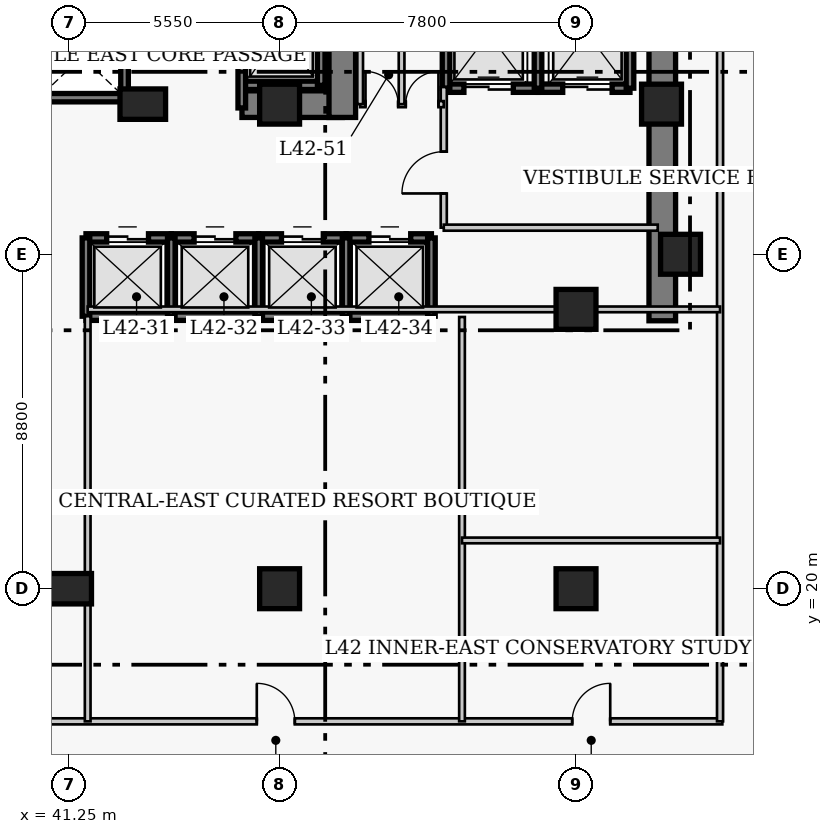
"""IFC4 building model, lengths in metres.
Left out: names, types, materials, properties, quantities, classifications, styles, units other than length and angle.
Written with IfcOpenShell. Run it as: python <this file> out.ifc"""

import sys

from ifc_helpers import new_model, si_unit, direction, frame, frame_2d, origin, origin_2d, place, context, subcontext, project, spatial, rectangle, extrude, element, fill, save


model = new_model("IFC4")
c1 = context("Model", 3, precision=1e-05, world=origin(), true_north=direction((0.0, 1.0)))
c2 = subcontext(c1, "Body", "Model", "MODEL_VIEW")
j1 = project(units=[si_unit("LENGTHUNIT", "METRE"), si_unit("PLANEANGLEUNIT", "RADIAN")], contexts=[c1])
p1 = place(None, origin())
s1 = spatial("IfcSite", under=j1, at=p1, CompositionType="ELEMENT")
p2 = place(p1, origin())
s2 = spatial("IfcBuilding", under=s1, at=p2, CompositionType="ELEMENT")
p3 = place(p2, frame((0.0, 0.0, 168.8)))
s3 = spatial("IfcBuildingStorey", under=s2, at=p3, CompositionType="ELEMENT", Elevation=168.8)
p4 = place(p3, frame((56.87, 27.05, 0.0), z_axis=(0.0, 0.0, 1.0), x_axis=(0.0, 1.0, 0.0)))
e1 = element("IfcWall", 1, at=p4, inside=s3, PredefinedType="SHEAR", context=c2, shape_type="SweptSolid", body=[
    extrude(rectangle(XDim=13.62, YDim=0.7, at=frame_2d((6.81, 0.0))), origin(), (0.0, 0.0, 1.0), 3.8),
])
p5 = place(p3, frame((45.81, 32.75, 0.0), z_axis=(0.0, 0.0, 1.0), x_axis=(1.0, 0.0, 0.0)))
e2 = element("IfcWall", 2, at=p5, inside=s3, PredefinedType="SHEAR", context=c2, shape_type="SweptSolid", body=[
    extrude(rectangle(XDim=2.64, YDim=0.7, at=frame_2d((1.32, 0.0))), origin(), (0.0, 0.0, 1.0), 3.8),
])
p6 = place(p3, frame((48.45, 32.4, 0.0), z_axis=(0.0, 0.0, 1.0), x_axis=(0.0, 1.0, 0.0)))
e3 = element("IfcWall", 3, at=p6, inside=s3, PredefinedType="SHEAR", context=c2, shape_type="SweptSolid", body=[
    extrude(rectangle(XDim=7.92, YDim=0.7, at=frame_2d((3.96, 0.0))), origin(), (0.0, 0.0, 1.0), 3.8),
])
p7 = place(p6, frame((5.8, 0.0, 0.0)))
e4 = element("IfcOpeningElement", 4, at=p7, cuts=e3, PredefinedType="OPENING", context=c2, shape_type="SweptSolid", body=[
    extrude(rectangle(XDim=1.1, YDim=2.15, at=frame_2d((0.55, 1.075))), frame((0.0, 0.36, 0.0), z_axis=(0.0, -1.0, 0.0), x_axis=(1.0, 0.0, 0.0)), (0.0, 0.0, 1.0), 0.72),
])
p8 = place(p3, frame((41.25, 20.0, 0.0), z_axis=(0.0, 0.0, 1.0), x_axis=(1.0, 0.0, 0.0)))
e5 = element("IfcColumn", 5, at=p8, inside=s3, PredefinedType="COLUMN", context=c2, shape_type="SweptSolid", body=[
    extrude(rectangle(XDim=1.2, YDim=0.8, at=origin_2d()), origin(), (0.0, 0.0, 1.0), 3.8),
])
for number, where, z_axis, x_axis in (
    (6, (46.8, 20.0, 0.0), (0.0, 0.0, 1.0), (1.0, 0.0, 0.0)),
    (7, (54.6, 20.0, 0.0), (0.0, 0.0, 1.0), (1.0, 0.0, 0.0)),
    (8, (57.35, 28.8, 0.0), (0.0, 0.0, 1.0), (1.0, 0.0, 0.0)),
):
    element("IfcColumn", number, at=place(p3, frame(where, z_axis=z_axis, x_axis=x_axis)), inside=s3, PredefinedType="COLUMN", context=c2, shape_type="SweptSolid", body=[
        extrude(rectangle(XDim=1.05, YDim=1.05, at=origin_2d()), origin(), (0.0, 0.0, 1.0), 3.8),
    ])
p9 = place(p3, frame((43.2, 32.75, 0.0), z_axis=(0.0, 0.0, 1.0), x_axis=(1.0, 0.0, 0.0)))
e9 = element("IfcColumn", 9, at=p9, inside=s3, PredefinedType="COLUMN", context=c2, shape_type="SweptSolid", body=[
    extrude(rectangle(XDim=1.2, YDim=0.8, at=origin_2d()), origin(), (0.0, 0.0, 1.0), 3.8),
])
for number, where, z_axis, x_axis in (
    (10, (46.8, 32.75, 0.0), (0.0, 0.0, 1.0), (1.0, 0.0, 0.0)),
    (11, (54.6, 27.35, 0.0), (0.0, 0.0, 1.0), (1.0, 0.0, 0.0)),
    (12, (56.85, 32.75, 0.0), (0.0, 0.0, 1.0), (1.0, 0.0, 0.0)),
):
    element("IfcColumn", number, at=place(p3, frame(where, z_axis=z_axis, x_axis=x_axis)), inside=s3, PredefinedType="COLUMN", context=c2, shape_type="SweptSolid", body=[
        extrude(rectangle(XDim=1.05, YDim=1.05, at=origin_2d()), origin(), (0.0, 0.0, 1.0), 3.8),
    ])
p10 = place(p3, frame((41.705, 29.23, 0.0), z_axis=(0.0, 0.0, 1.0), x_axis=(1.0, 0.0, 0.0)))
e13 = element("IfcWall", 13, at=p10, inside=s3, PredefinedType="SHEAR", context=c2, shape_type="SweptSolid", body=[
    extrude(rectangle(XDim=2.245, YDim=0.22, at=frame_2d((1.123, 0.0))), origin(), (0.0, 0.0, 1.0), 3.8),
])
p11 = place(p10, frame((0.545, 0.0, 0.0)))
e14 = element("IfcOpeningElement", 14, at=p11, cuts=e13, PredefinedType="OPENING", context=c2, shape_type="SweptSolid", body=[
    extrude(rectangle(XDim=1.1, YDim=2.15, at=frame_2d((0.55, 1.075))), frame((0.0, 0.12, 0.0), z_axis=(0.0, -1.0, 0.0), x_axis=(1.0, 0.0, 0.0)), (0.0, 0.0, 1.0), 0.24),
])
p12 = place(p3, frame((41.705, 27.17, 0.0), z_axis=(0.0, 0.0, 1.0), x_axis=(1.0, 0.0, 0.0)))
e15 = element("IfcWall", 15, at=p12, inside=s3, PredefinedType="SHEAR", context=c2, shape_type="SweptSolid", body=[
    extrude(rectangle(XDim=2.245, YDim=0.22, at=frame_2d((1.123, 0.0))), origin(), (0.0, 0.0, 1.0), 3.8),
])
p13 = place(p3, frame((41.705, 27.17, 0.0), z_axis=(0.0, 0.0, 1.0), x_axis=(0.0, 1.0, 0.0)))
e16 = element("IfcWall", 16, at=p13, inside=s3, PredefinedType="SHEAR", context=c2, shape_type="SweptSolid", body=[
    extrude(rectangle(XDim=2.06, YDim=0.2, at=frame_2d((1.03, 0.0))), origin(), (0.0, 0.0, 1.0), 3.8),
])
p14 = place(p3, frame((43.95, 29.23, 0.0), z_axis=(0.0, 0.0, 1.0), x_axis=(1.0, 0.0, 0.0)))
e17 = element("IfcWall", 17, at=p14, inside=s3, PredefinedType="SHEAR", context=c2, shape_type="SweptSolid", body=[
    extrude(rectangle(XDim=2.3, YDim=0.22, at=frame_2d((1.15, 0.0))), origin(), (0.0, 0.0, 1.0), 3.8),
])
p15 = place(p14, frame((0.6, 0.0, 0.0)))
e18 = element("IfcOpeningElement", 18, at=p15, cuts=e17, PredefinedType="OPENING", context=c2, shape_type="SweptSolid", body=[
    extrude(rectangle(XDim=1.1, YDim=2.15, at=frame_2d((0.55, 1.075))), frame((0.0, 0.12, 0.0), z_axis=(0.0, -1.0, 0.0), x_axis=(1.0, 0.0, 0.0)), (0.0, 0.0, 1.0), 0.24),
])
p16 = place(p3, frame((43.95, 27.17, 0.0), z_axis=(0.0, 0.0, 1.0), x_axis=(1.0, 0.0, 0.0)))
e19 = element("IfcWall", 19, at=p16, inside=s3, PredefinedType="SHEAR", context=c2, shape_type="SweptSolid", body=[
    extrude(rectangle(XDim=2.3, YDim=0.22, at=frame_2d((1.15, 0.0))), origin(), (0.0, 0.0, 1.0), 3.8),
])
p17 = place(p3, frame((43.95, 27.17, 0.0), z_axis=(0.0, 0.0, 1.0), x_axis=(0.0, 1.0, 0.0)))
e20 = element("IfcWall", 20, at=p17, inside=s3, PredefinedType="SHEAR", context=c2, shape_type="SweptSolid", body=[
    extrude(rectangle(XDim=2.06, YDim=0.2, at=frame_2d((1.03, 0.0))), origin(), (0.0, 0.0, 1.0), 3.8),
])
p18 = place(p3, frame((46.25, 29.23, 0.0), z_axis=(0.0, 0.0, 1.0), x_axis=(1.0, 0.0, 0.0)))
e21 = element("IfcWall", 21, at=p18, inside=s3, PredefinedType="SHEAR", context=c2, shape_type="SweptSolid", body=[
    extrude(rectangle(XDim=2.3, YDim=0.22, at=frame_2d((1.15, 0.0))), origin(), (0.0, 0.0, 1.0), 3.8),
])
p19 = place(p18, frame((0.6, 0.0, 0.0)))
e22 = element("IfcOpeningElement", 22, at=p19, cuts=e21, PredefinedType="OPENING", context=c2, shape_type="SweptSolid", body=[
    extrude(rectangle(XDim=1.1, YDim=2.15, at=frame_2d((0.55, 1.075))), frame((0.0, 0.12, 0.0), z_axis=(0.0, -1.0, 0.0), x_axis=(1.0, 0.0, 0.0)), (0.0, 0.0, 1.0), 0.24),
])
p20 = place(p3, frame((46.25, 27.17, 0.0), z_axis=(0.0, 0.0, 1.0), x_axis=(1.0, 0.0, 0.0)))
e23 = element("IfcWall", 23, at=p20, inside=s3, PredefinedType="SHEAR", context=c2, shape_type="SweptSolid", body=[
    extrude(rectangle(XDim=2.3, YDim=0.22, at=frame_2d((1.15, 0.0))), origin(), (0.0, 0.0, 1.0), 3.8),
])
p21 = place(p3, frame((46.25, 27.17, 0.0), z_axis=(0.0, 0.0, 1.0), x_axis=(0.0, 1.0, 0.0)))
e24 = element("IfcWall", 24, at=p21, inside=s3, PredefinedType="SHEAR", context=c2, shape_type="SweptSolid", body=[
    extrude(rectangle(XDim=2.06, YDim=0.2, at=frame_2d((1.03, 0.0))), origin(), (0.0, 0.0, 1.0), 3.8),
])
p22 = place(p3, frame((48.55, 29.23, 0.0), z_axis=(0.0, 0.0, 1.0), x_axis=(1.0, 0.0, 0.0)))
e25 = element("IfcWall", 25, at=p22, inside=s3, PredefinedType="SHEAR", context=c2, shape_type="SweptSolid", body=[
    extrude(rectangle(XDim=2.245, YDim=0.22, at=frame_2d((1.123, 0.0))), origin(), (0.0, 0.0, 1.0), 3.8),
])
p23 = place(p22, frame((0.6, 0.0, 0.0)))
e26 = element("IfcOpeningElement", 26, at=p23, cuts=e25, PredefinedType="OPENING", context=c2, shape_type="SweptSolid", body=[
    extrude(rectangle(XDim=1.1, YDim=2.15, at=frame_2d((0.55, 1.075))), frame((0.0, 0.12, 0.0), z_axis=(0.0, -1.0, 0.0), x_axis=(1.0, 0.0, 0.0)), (0.0, 0.0, 1.0), 0.24),
])
p24 = place(p3, frame((48.55, 27.17, 0.0), z_axis=(0.0, 0.0, 1.0), x_axis=(1.0, 0.0, 0.0)))
e27 = element("IfcWall", 27, at=p24, inside=s3, PredefinedType="SHEAR", context=c2, shape_type="SweptSolid", body=[
    extrude(rectangle(XDim=2.245, YDim=0.22, at=frame_2d((1.123, 0.0))), origin(), (0.0, 0.0, 1.0), 3.8),
])
for number, where, z_axis, x_axis in (
    (28, (48.55, 27.17, 0.0), (0.0, 0.0, 1.0), (0.0, 1.0, 0.0)),
    (29, (50.795, 27.17, 0.0), (0.0, 0.0, 1.0), (0.0, 1.0, 0.0)),
):
    element("IfcWall", number, at=place(p3, frame(where, z_axis=z_axis, x_axis=x_axis)), inside=s3, PredefinedType="SHEAR", context=c2, shape_type="SweptSolid", body=[
        extrude(rectangle(XDim=2.06, YDim=0.2, at=frame_2d((1.03, 0.0))), origin(), (0.0, 0.0, 1.0), 3.8),
    ])
p25 = place(p3, frame((40.4, 32.92, 0.0), z_axis=(0.0, 0.0, 1.0), x_axis=(1.0, 0.0, 0.0)))
e30 = element("IfcWall", 30, at=p25, inside=s3, PredefinedType="SHEAR", context=c2, shape_type="SweptSolid", body=[
    extrude(rectangle(XDim=2.32, YDim=0.22, at=frame_2d((1.16, 0.0))), origin(), (0.0, 0.0, 1.0), 3.8),
])
p26 = place(p3, frame((42.72, 32.92, 0.0), z_axis=(0.0, 0.0, 1.0), x_axis=(0.0, 1.0, 0.0)))
e31 = element("IfcWall", 31, at=p26, inside=s3, PredefinedType="SHEAR", context=c2, shape_type="SweptSolid", body=[
    extrude(rectangle(XDim=2.16, YDim=0.2, at=frame_2d((1.08, 0.0))), origin(), (0.0, 0.0, 1.0), 3.8),
])
p27 = place(p3, frame((51.18, 33.17, 0.0), z_axis=(0.0, 0.0, 1.0), x_axis=(1.0, 0.0, 0.0)))
e32 = element("IfcWall", 32, at=p27, inside=s3, PredefinedType="SHEAR", context=c2, shape_type="SweptSolid", body=[
    extrude(rectangle(XDim=2.42, YDim=0.22, at=frame_2d((1.21, 0.0))), origin(), (0.0, 0.0, 1.0), 3.8),
])
p28 = place(p27, frame((0.47, 0.0, 0.0)))
e33 = element("IfcOpeningElement", 33, at=p28, cuts=e32, PredefinedType="OPENING", context=c2, shape_type="SweptSolid", body=[
    extrude(rectangle(XDim=1.3, YDim=2.15, at=frame_2d((0.65, 1.075))), frame((0.0, 0.12, 0.0), z_axis=(0.0, -1.0, 0.0), x_axis=(1.0, 0.0, 0.0)), (0.0, 0.0, 1.0), 0.24),
])
p29 = place(p3, frame((51.18, 33.17, 0.0), z_axis=(0.0, 0.0, 1.0), x_axis=(0.0, 1.0, 0.0)))
e34 = element("IfcWall", 34, at=p29, inside=s3, PredefinedType="SHEAR", context=c2, shape_type="SweptSolid", body=[
    extrude(rectangle(XDim=2.86, YDim=0.2, at=frame_2d((1.43, 0.0))), origin(), (0.0, 0.0, 1.0), 3.8),
])
p30 = place(p3, frame((53.6, 33.17, 0.0), z_axis=(0.0, 0.0, 1.0), x_axis=(1.0, 0.0, 0.0)))
e35 = element("IfcWall", 35, at=p30, inside=s3, PredefinedType="SHEAR", context=c2, shape_type="SweptSolid", body=[
    extrude(rectangle(XDim=2.42, YDim=0.22, at=frame_2d((1.21, 0.0))), origin(), (0.0, 0.0, 1.0), 3.8),
])
p31 = place(p30, frame((0.65, 0.0, 0.0)))
e36 = element("IfcOpeningElement", 36, at=p31, cuts=e35, PredefinedType="OPENING", context=c2, shape_type="SweptSolid", body=[
    extrude(rectangle(XDim=1.3, YDim=2.15, at=frame_2d((0.65, 1.075))), frame((0.0, 0.12, 0.0), z_axis=(0.0, -1.0, 0.0), x_axis=(1.0, 0.0, 0.0)), (0.0, 0.0, 1.0), 0.24),
])
for number, where, z_axis, x_axis in (
    (37, (53.6, 33.17, 0.0), (0.0, 0.0, 1.0), (0.0, 1.0, 0.0)),
    (38, (56.02, 33.17, 0.0), (0.0, 0.0, 1.0), (0.0, 1.0, 0.0)),
):
    element("IfcWall", number, at=place(p3, frame(where, z_axis=z_axis, x_axis=x_axis)), inside=s3, PredefinedType="SHEAR", context=c2, shape_type="SweptSolid", body=[
        extrude(rectangle(XDim=2.86, YDim=0.2, at=frame_2d((1.43, 0.0))), origin(), (0.0, 0.0, 1.0), 3.8),
    ])
p32 = place(p3, frame((45.805, 33.245, 0.0), z_axis=(0.0, 0.0, 1.0), x_axis=(1.0, 0.0, 0.0)))
e39 = element("IfcWall", 39, at=p32, inside=s3, PredefinedType="SHEAR", context=c2, shape_type="SweptSolid", body=[
    extrude(rectangle(XDim=2.09, YDim=0.22, at=frame_2d((1.045, 0.0))), origin(), (0.0, 0.0, 1.0), 3.8),
])
p33 = place(p3, frame((45.805, 32.65, 0.0), z_axis=(0.0, 0.0, 1.0), x_axis=(0.0, 1.0, 0.0)))
e40 = element("IfcWall", 40, at=p33, inside=s3, PredefinedType="SHEAR", context=c2, shape_type="SweptSolid", body=[
    extrude(rectangle(XDim=3.505, YDim=0.2, at=frame_2d((1.752, 0.0))), origin(), (0.0, 0.0, 1.0), 3.8),
])
p34 = place(p3, frame((47.895, 33.245, 0.0), z_axis=(0.0, 0.0, 1.0), x_axis=(0.0, 1.0, 0.0)))
e41 = element("IfcWall", 41, at=p34, inside=s3, PredefinedType="SHEAR", context=c2, shape_type="SweptSolid", body=[
    extrude(rectangle(XDim=2.91, YDim=0.2, at=frame_2d((1.455, 0.0))), origin(), (0.0, 0.0, 1.0), 3.8),
])
p35 = place(p3, frame((51.12, 29.5, 0.0), z_axis=(0.0, 0.0, 1.0), x_axis=(0.0, 1.0, 0.0)))
e42 = element("IfcWall", 42, at=p35, inside=s3, PredefinedType="PARTITIONING", context=c2, shape_type="SweptSolid", body=[
    extrude(rectangle(XDim=3.7, YDim=0.16, at=frame_2d((1.85, 0.0))), origin(), (0.0, 0.0, 1.0), 3.55),
])
p36 = place(p35, frame((0.9, 0.0, 0.0)))
e43 = element("IfcOpeningElement", 43, at=p36, cuts=e42, PredefinedType="OPENING", context=c2, shape_type="SweptSolid", body=[
    extrude(rectangle(XDim=1.1, YDim=2.15, at=frame_2d((0.55, 1.075))), frame((0.0, 0.09, 0.0), z_axis=(0.0, -1.0, 0.0), x_axis=(1.0, 0.0, 0.0)), (0.0, 0.0, 1.0), 0.18),
])
p37 = place(p3, frame((51.12, 29.5, 0.0), z_axis=(0.0, 0.0, 1.0), x_axis=(1.0, 0.0, 0.0)))
e44 = element("IfcWall", 44, at=p37, inside=s3, PredefinedType="PARTITIONING", context=c2, shape_type="SweptSolid", body=[
    extrude(rectangle(XDim=5.63, YDim=0.16, at=frame_2d((2.815, 0.0))), origin(), (0.0, 0.0, 1.0), 3.55),
])
p38 = place(p3, frame((48.92, 32.75, 0.0), z_axis=(0.0, 0.0, 1.0), x_axis=(1.0, 0.0, 0.0)))
e45 = element("IfcWall", 45, at=p38, inside=s3, PredefinedType="PARTITIONING", context=c2, shape_type="SweptSolid", body=[
    extrude(rectangle(XDim=2.2, YDim=0.16, at=frame_2d((1.1, 0.0))), origin(), (0.0, 0.0, 1.0), 3.55),
])
p39 = place(p38, frame((0.14, 0.0, 0.0)))
e46 = element("IfcOpeningElement", 46, at=p39, cuts=e45, PredefinedType="OPENING", context=c2, shape_type="SweptSolid", body=[
    extrude(rectangle(XDim=0.86, YDim=2.05, at=frame_2d((0.43, 1.025))), frame((0.0, 0.09, 0.0), z_axis=(0.0, -1.0, 0.0), x_axis=(1.0, 0.0, 0.0)), (0.0, 0.0, 1.0), 0.18),
])
p40 = place(p38, frame((1.2, 0.0, 0.0)))
e47 = element("IfcOpeningElement", 47, at=p40, cuts=e45, PredefinedType="OPENING", context=c2, shape_type="SweptSolid", body=[
    extrude(rectangle(XDim=0.86, YDim=2.05, at=frame_2d((0.43, 1.025))), frame((0.0, 0.09, 0.0), z_axis=(0.0, -1.0, 0.0), x_axis=(1.0, 0.0, 0.0)), (0.0, 0.0, 1.0), 0.18),
])
for number, where, z_axis, x_axis in (
    (48, (48.92, 32.75, 0.0), (0.0, 0.0, 1.0), (0.0, 1.0, 0.0)),
    (49, (50.01, 32.75, 0.0), (0.0, 0.0, 1.0), (0.0, 1.0, 0.0)),
):
    element("IfcWall", number, at=place(p3, frame(where, z_axis=z_axis, x_axis=x_axis)), inside=s3, PredefinedType="PARTITIONING", context=c2, shape_type="SweptSolid", body=[
        extrude(rectangle(XDim=3.62, YDim=0.15, at=frame_2d((1.81, 0.0))), origin(), (0.0, 0.0, 1.0), 3.55),
    ])
p41 = place(p3, frame((35.85, 16.51, 0.0), z_axis=(0.0, 0.0, 1.0), x_axis=(1.0, 0.0, 0.0)))
e50 = element("IfcWall", 50, at=p41, inside=s3, PredefinedType="PARTITIONING", context=c2, shape_type="SweptSolid", body=[
    extrude(rectangle(XDim=22.6, YDim=0.16, at=frame_2d((11.3, 0.0))), origin(), (0.0, 0.0, 1.0), 3.55),
])
p42 = place(p41, frame((10.35, 0.0, 0.0)))
e51 = element("IfcOpeningElement", 51, at=p42, cuts=e50, PredefinedType="OPENING", context=c2, shape_type="SweptSolid", body=[
    extrude(rectangle(XDim=1.0, YDim=2.15, at=frame_2d((0.5, 1.075))), frame((0.0, 0.09, 0.0), z_axis=(0.0, -1.0, 0.0), x_axis=(1.0, 0.0, 0.0)), (0.0, 0.0, 1.0), 0.18),
])
p43 = place(p41, frame((18.65, 0.0, 0.0)))
e52 = element("IfcOpeningElement", 52, at=p43, cuts=e50, PredefinedType="OPENING", context=c2, shape_type="SweptSolid", body=[
    extrude(rectangle(XDim=1.0, YDim=2.15, at=frame_2d((0.5, 1.075))), frame((0.0, 0.09, 0.0), z_axis=(0.0, -1.0, 0.0), x_axis=(1.0, 0.0, 0.0)), (0.0, 0.0, 1.0), 0.18),
])
p44 = place(p3, frame((58.39, 16.51, 0.0), z_axis=(0.0, 0.0, 1.0), x_axis=(0.0, 1.0, 0.0)))
e53 = element("IfcWall", 53, at=p44, inside=s3, PredefinedType="PARTITIONING", context=c2, shape_type="SweptSolid", body=[
    extrude(rectangle(XDim=24.14, YDim=0.16, at=frame_2d((12.07, 0.0))), origin(), (0.0, 0.0, 1.0), 3.093),
])
p45 = place(p3, frame((41.75, 16.51, 0.0), z_axis=(0.0, 0.0, 1.0), x_axis=(0.0, 1.0, 0.0)))
e54 = element("IfcWall", 54, at=p45, inside=s3, PredefinedType="PARTITIONING", context=c2, shape_type="SweptSolid", body=[
    extrude(rectangle(XDim=10.66, YDim=0.15, at=frame_2d((5.33, 0.0))), origin(), (0.0, 0.0, 1.0), 3.55),
])
p46 = place(p3, frame((51.6, 16.51, 0.0), z_axis=(0.0, 0.0, 1.0), x_axis=(0.0, 1.0, 0.0)))
e55 = element("IfcWall", 55, at=p46, inside=s3, PredefinedType="PARTITIONING", context=c2, shape_type="SweptSolid", body=[
    extrude(rectangle(XDim=10.64, YDim=0.15, at=frame_2d((5.32, 0.0))), origin(), (0.0, 0.0, 1.0), 3.55),
])
p47 = place(p3, frame((41.75, 27.35, 0.0), z_axis=(0.0, 0.0, 1.0), x_axis=(1.0, 0.0, 0.0)))
e56 = element("IfcWall", 56, at=p47, inside=s3, PredefinedType="PARTITIONING", context=c2, shape_type="SweptSolid", body=[
    extrude(rectangle(XDim=16.64, YDim=0.15, at=frame_2d((8.32, 0.0))), origin(), (0.0, 0.0, 1.0), 3.55),
])
p48 = place(p3, frame((51.6, 21.27, 0.0), z_axis=(0.0, 0.0, 1.0), x_axis=(1.0, 0.0, 0.0)))
e57 = element("IfcWall", 57, at=p48, inside=s3, PredefinedType="PARTITIONING", context=c2, shape_type="SweptSolid", body=[
    extrude(rectangle(XDim=6.79, YDim=0.15, at=frame_2d((3.395, 0.0))), origin(), (0.0, 0.0, 1.0), 3.55),
])
p49 = place(p11, origin())
e58 = element("IfcDoor", 58, at=p49, inside=s3, OperationType="DOUBLE_DOOR_SLIDING", PredefinedType="DOOR", context=c2, shape_type="SweptSolid", body=[
    extrude(rectangle(XDim=1.1, YDim=2.15, at=frame_2d((0.55, 1.075))), frame((0.0, 0.025, 0.0), z_axis=(0.0, -1.0, 0.0), x_axis=(1.0, 0.0, 0.0)), (0.0, 0.0, 1.0), 0.05),
])
fill(e14, e58)
p50 = place(p15, origin())
e59 = element("IfcDoor", 59, at=p50, inside=s3, OperationType="DOUBLE_DOOR_SLIDING", PredefinedType="DOOR", context=c2, shape_type="SweptSolid", body=[
    extrude(rectangle(XDim=1.1, YDim=2.15, at=frame_2d((0.55, 1.075))), frame((0.0, 0.025, 0.0), z_axis=(0.0, -1.0, 0.0), x_axis=(1.0, 0.0, 0.0)), (0.0, 0.0, 1.0), 0.05),
])
fill(e18, e59)
p51 = place(p19, origin())
e60 = element("IfcDoor", 60, at=p51, inside=s3, OperationType="DOUBLE_DOOR_SLIDING", PredefinedType="DOOR", context=c2, shape_type="SweptSolid", body=[
    extrude(rectangle(XDim=1.1, YDim=2.15, at=frame_2d((0.55, 1.075))), frame((0.0, 0.025, 0.0), z_axis=(0.0, -1.0, 0.0), x_axis=(1.0, 0.0, 0.0)), (0.0, 0.0, 1.0), 0.05),
])
fill(e22, e60)
p52 = place(p23, origin())
e61 = element("IfcDoor", 61, at=p52, inside=s3, OperationType="DOUBLE_DOOR_SLIDING", PredefinedType="DOOR", context=c2, shape_type="SweptSolid", body=[
    extrude(rectangle(XDim=1.1, YDim=2.15, at=frame_2d((0.55, 1.075))), frame((0.0, 0.025, 0.0), z_axis=(0.0, -1.0, 0.0), x_axis=(1.0, 0.0, 0.0)), (0.0, 0.0, 1.0), 0.05),
])
fill(e26, e61)
p53 = place(p28, origin())
e62 = element("IfcDoor", 62, at=p53, inside=s3, OperationType="DOUBLE_DOOR_SLIDING", PredefinedType="DOOR", context=c2, shape_type="SweptSolid", body=[
    extrude(rectangle(XDim=1.3, YDim=2.15, at=frame_2d((0.65, 1.075))), frame((0.0, 0.025, 0.0), z_axis=(0.0, -1.0, 0.0), x_axis=(1.0, 0.0, 0.0)), (0.0, 0.0, 1.0), 0.05),
])
fill(e33, e62)
p54 = place(p31, origin())
e63 = element("IfcDoor", 63, at=p54, inside=s3, OperationType="DOUBLE_DOOR_SLIDING", PredefinedType="DOOR", context=c2, shape_type="SweptSolid", body=[
    extrude(rectangle(XDim=1.3, YDim=2.15, at=frame_2d((0.65, 1.075))), frame((0.0, 0.025, 0.0), z_axis=(0.0, -1.0, 0.0), x_axis=(1.0, 0.0, 0.0)), (0.0, 0.0, 1.0), 0.05),
])
fill(e36, e63)
p55 = place(p36, origin())
e64 = element("IfcDoor", 64, at=p55, inside=s3, OperationType="SINGLE_SWING_LEFT", PredefinedType="DOOR", context=c2, shape_type="SweptSolid", body=[
    extrude(rectangle(XDim=1.1, YDim=2.15, at=frame_2d((0.55, 1.075))), frame((0.0, 0.025, 0.0), z_axis=(0.0, -1.0, 0.0), x_axis=(1.0, 0.0, 0.0)), (0.0, 0.0, 1.0), 0.05),
])
fill(e43, e64)
p56 = place(p39, origin())
e65 = element("IfcDoor", 65, at=p56, inside=s3, OperationType="SINGLE_SWING_LEFT", PredefinedType="DOOR", context=c2, shape_type="SweptSolid", body=[
    extrude(rectangle(XDim=0.86, YDim=2.05, at=frame_2d((0.43, 1.025))), frame((0.0, 0.025, 0.0), z_axis=(0.0, -1.0, 0.0), x_axis=(1.0, 0.0, 0.0)), (0.0, 0.0, 1.0), 0.05),
])
fill(e46, e65)
p57 = place(p40, origin())
e66 = element("IfcDoor", 66, at=p57, inside=s3, OperationType="SINGLE_SWING_RIGHT", PredefinedType="DOOR", context=c2, shape_type="SweptSolid", body=[
    extrude(rectangle(XDim=0.86, YDim=2.05, at=frame_2d((0.43, 1.025))), frame((0.0, 0.025, 0.0), z_axis=(0.0, -1.0, 0.0), x_axis=(1.0, 0.0, 0.0)), (0.0, 0.0, 1.0), 0.05),
])
fill(e47, e66)
p58 = place(p42, origin())
e67 = element("IfcDoor", 67, at=p58, inside=s3, OperationType="SINGLE_SWING_LEFT", PredefinedType="DOOR", context=c2, shape_type="SweptSolid", body=[
    extrude(rectangle(XDim=1.0, YDim=2.15, at=frame_2d((0.5, 1.075))), frame((0.0, 0.025, 0.0), z_axis=(0.0, -1.0, 0.0), x_axis=(1.0, 0.0, 0.0)), (0.0, 0.0, 1.0), 0.05),
])
fill(e51, e67)
p59 = place(p43, origin())
e68 = element("IfcDoor", 68, at=p59, inside=s3, OperationType="SINGLE_SWING_RIGHT", PredefinedType="DOOR", context=c2, shape_type="SweptSolid", body=[
    extrude(rectangle(XDim=1.0, YDim=2.15, at=frame_2d((0.5, 1.075))), frame((0.0, 0.025, 0.0), z_axis=(0.0, -1.0, 0.0), x_axis=(1.0, 0.0, 0.0)), (0.0, 0.0, 1.0), 0.05),
])
fill(e52, e68)
save(model, sys.argv[1])
